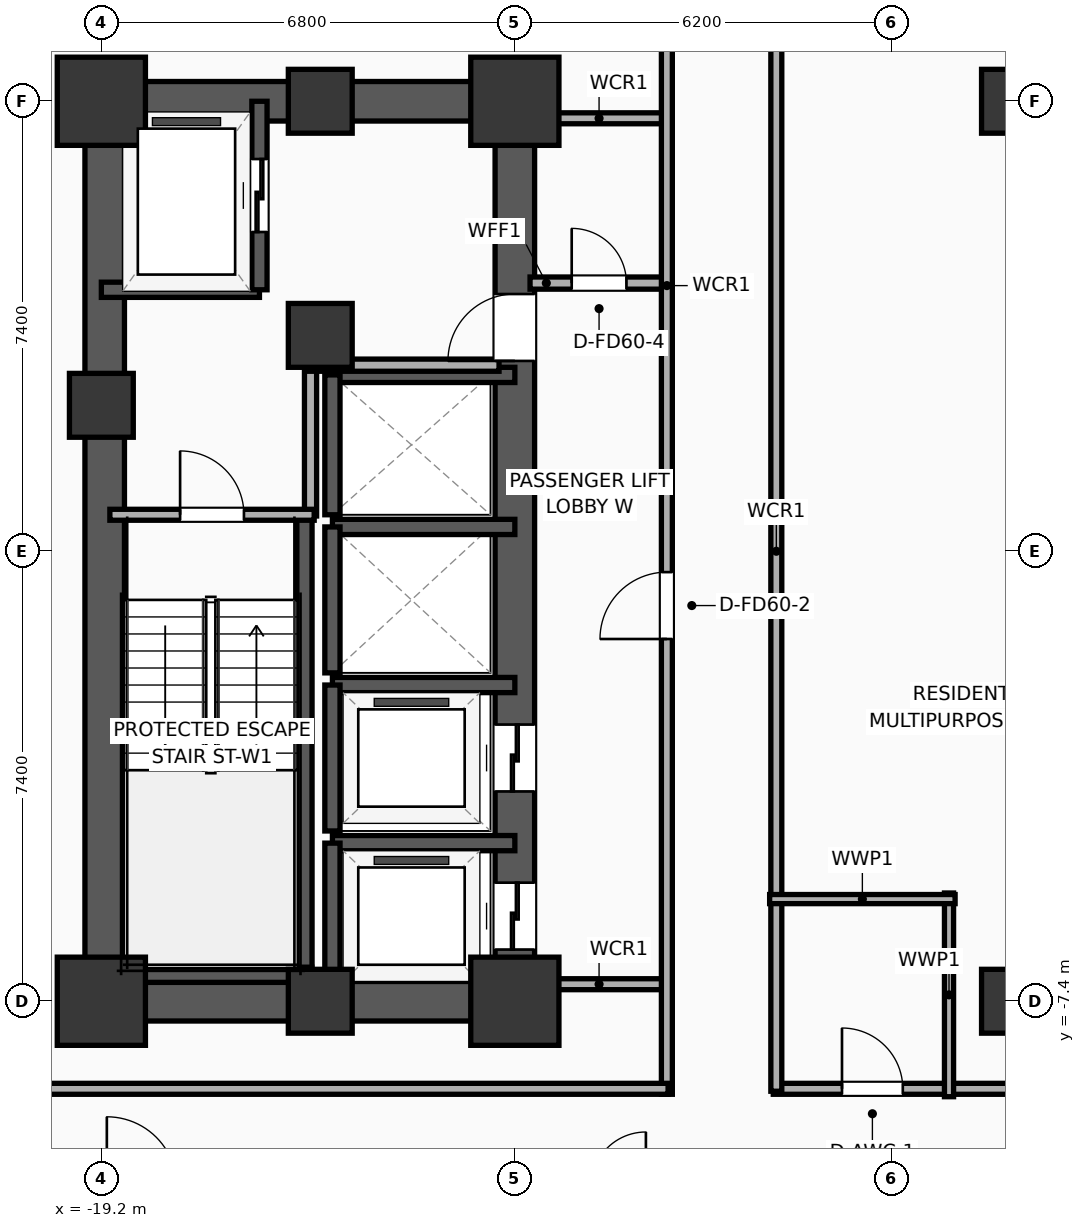
"""IFC4 building model, lengths in metres.
Left out: names, types, materials, properties, quantities, classifications, styles, units other than length and angle.
Written with IfcOpenShell. Run it as: python <this file> out.ifc"""

import sys

from ifc_helpers import new_model, si_unit, direction, frame, frame_2d, origin, origin_2d, place, context, subcontext, project, spatial, rectangle, extrude, element, fill, save


model = new_model("IFC4")
c1 = context("Model", 3, precision=1e-05, world=origin(), true_north=direction((0.0, 1.0)))
c2 = subcontext(c1, "Body", "Model", "MODEL_VIEW")
j1 = project(units=[si_unit("LENGTHUNIT", "METRE"), si_unit("PLANEANGLEUNIT", "RADIAN")], contexts=[c1])
p1 = place(None, origin())
s1 = spatial("IfcSite", under=j1, at=p1, CompositionType="ELEMENT")
p2 = place(p1, origin())
s2 = spatial("IfcBuilding", under=s1, at=p2, CompositionType="ELEMENT")
p3 = place(p2, frame((0.0, 0.0, 57.2)))
s3 = spatial("IfcBuildingStorey", under=s2, at=p3, CompositionType="ELEMENT", Elevation=57.2)
p4 = place(p3, frame((-19.2, -7.4, 0.0), z_axis=(0.0, 0.0, 1.0), x_axis=(1.0, 0.0, 0.0)))
e1 = element("IfcColumn", 1, at=p4, inside=s3, PredefinedType="COLUMN", context=c2, shape_type="SweptSolid", body=[
    extrude(rectangle(XDim=1.45, YDim=1.45, at=origin_2d()), origin(), (0.0, 0.0, 1.0), 3.9),
])
p5 = place(p3, frame((-19.2, 2.4, 0.0), z_axis=(0.0, 0.0, 1.0), x_axis=(1.0, 0.0, 0.0)))
e2 = element("IfcColumn", 2, at=p5, inside=s3, PredefinedType="COLUMN", context=c2, shape_type="SweptSolid", body=[
    extrude(rectangle(XDim=1.05, YDim=1.05, at=origin_2d()), origin(), (0.0, 0.0, 1.0), 3.9),
])
p6 = place(p3, frame((-19.2, 7.4, 0.0), z_axis=(0.0, 0.0, 1.0), x_axis=(1.0, 0.0, 0.0)))
e3 = element("IfcColumn", 3, at=p6, inside=s3, PredefinedType="COLUMN", context=c2, shape_type="SweptSolid", body=[
    extrude(rectangle(XDim=1.45, YDim=1.45, at=origin_2d()), origin(), (0.0, 0.0, 1.0), 3.9),
])
for number, where, z_axis, x_axis in (
    (4, (-15.6, -7.4, 0.0), (0.0, 0.0, 1.0), (1.0, 0.0, 0.0)),
    (5, (-15.6, 7.4, 0.0), (0.0, 0.0, 1.0), (1.0, 0.0, 0.0)),
):
    element("IfcColumn", number, at=place(p3, frame(where, z_axis=z_axis, x_axis=x_axis)), inside=s3, PredefinedType="COLUMN", context=c2, shape_type="SweptSolid", body=[
        extrude(rectangle(XDim=1.05, YDim=1.05, at=origin_2d()), origin(), (0.0, 0.0, 1.0), 3.9),
    ])
p7 = place(p3, frame((-12.4, -7.4, 0.0), z_axis=(0.0, 0.0, 1.0), x_axis=(1.0, 0.0, 0.0)))
e6 = element("IfcColumn", 6, at=p7, inside=s3, PredefinedType="COLUMN", context=c2, shape_type="SweptSolid", body=[
    extrude(rectangle(XDim=1.45, YDim=1.45, at=origin_2d()), origin(), (0.0, 0.0, 1.0), 3.9),
])
p8 = place(p3, frame((-15.6, 3.55, 0.0), z_axis=(0.0, 0.0, 1.0), x_axis=(1.0, 0.0, 0.0)))
e7 = element("IfcColumn", 7, at=p8, inside=s3, PredefinedType="COLUMN", context=c2, shape_type="SweptSolid", body=[
    extrude(rectangle(XDim=1.05, YDim=1.05, at=origin_2d()), origin(), (0.0, 0.0, 1.0), 3.9),
])
p9 = place(p3, frame((-12.4, 7.4, 0.0), z_axis=(0.0, 0.0, 1.0), x_axis=(1.0, 0.0, 0.0)))
e8 = element("IfcColumn", 8, at=p9, inside=s3, PredefinedType="COLUMN", context=c2, shape_type="SweptSolid", body=[
    extrude(rectangle(XDim=1.45, YDim=1.45, at=origin_2d()), origin(), (0.0, 0.0, 1.0), 3.9),
])
for number, where, z_axis, x_axis in (
    (9, (-19.525, -7.4, 0.0), (0.0, 0.0, 1.0), (1.0, 0.0, 0.0)),
    (10, (-19.525, 7.4, 0.0), (0.0, 0.0, 1.0), (1.0, 0.0, 0.0)),
):
    element("IfcWall", number, at=place(p3, frame(where, z_axis=z_axis, x_axis=x_axis)), inside=s3, PredefinedType="SHEAR", context=c2, shape_type="SweptSolid", body=[
        extrude(rectangle(XDim=7.45, YDim=0.65, at=frame_2d((3.725, 0.0))), origin(), (0.0, 0.0, 1.0), 3.65),
    ])
p10 = place(p3, frame((-19.145, -7.4, 0.0), z_axis=(0.0, 0.0, 1.0), x_axis=(0.0, 1.0, 0.0)))
e11 = element("IfcWall", 11, at=p10, inside=s3, PredefinedType="SHEAR", context=c2, shape_type="SweptSolid", body=[
    extrude(rectangle(XDim=14.8, YDim=0.65, at=frame_2d((7.4, 0.0))), origin(), (0.0, 0.0, 1.0), 3.65),
])
p11 = place(p3, frame((-12.4, -7.4, 0.0), z_axis=(0.0, 0.0, 1.0), x_axis=(0.0, 1.0, 0.0)))
e12 = element("IfcWall", 12, at=p11, inside=s3, PredefinedType="SHEAR", context=c2, shape_type="SweptSolid", body=[
    extrude(rectangle(XDim=14.8, YDim=0.65, at=frame_2d((7.4, 0.0))), origin(), (0.0, 0.0, 1.0), 3.65),
])
p12 = place(p11, frame((0.85, 0.0, 0.0)))
e13 = element("IfcOpeningElement", 13, at=p12, cuts=e12, PredefinedType="OPENING", context=c2, shape_type="SweptSolid", body=[
    extrude(rectangle(XDim=1.1, YDim=2.05, at=frame_2d((0.55, 1.025))), frame((0.0, 0.335, 0.0), z_axis=(0.0, -1.0, 0.0), x_axis=(1.0, 0.0, 0.0)), (0.0, 0.0, 1.0), 0.67),
])
p13 = place(p11, frame((3.45, 0.0, 0.0)))
e14 = element("IfcOpeningElement", 14, at=p13, cuts=e12, PredefinedType="OPENING", context=c2, shape_type="SweptSolid", body=[
    extrude(rectangle(XDim=1.1, YDim=2.05, at=frame_2d((0.55, 1.025))), frame((0.0, 0.335, 0.0), z_axis=(0.0, -1.0, 0.0), x_axis=(1.0, 0.0, 0.0)), (0.0, 0.0, 1.0), 0.67),
])
p14 = place(p11, frame((10.53, 0.0, 0.0)))
e15 = element("IfcOpeningElement", 15, at=p14, cuts=e12, PredefinedType="OPENING", context=c2, shape_type="SweptSolid", body=[
    extrude(rectangle(XDim=1.1, YDim=2.05, at=frame_2d((0.55, 1.025))), frame((0.0, 0.335, 0.0), z_axis=(0.0, -1.0, 0.0), x_axis=(1.0, 0.0, 0.0)), (0.0, 0.0, 1.0), 0.67),
])
p15 = place(p3, frame((-15.86, -7.085, 0.0), z_axis=(0.0, 0.0, 1.0), x_axis=(0.0, 1.0, 0.0)))
e16 = element("IfcWall", 16, at=p15, inside=s3, PredefinedType="SOLIDWALL", context=c2, shape_type="SweptSolid", body=[
    extrude(rectangle(XDim=7.685, YDim=0.25, at=frame_2d((3.843, 0.0))), origin(), (0.0, 0.0, 1.0), 3.65),
])
p16 = place(p3, frame((-19.2, -6.965, 0.0), z_axis=(0.0, 0.0, 1.0), x_axis=(1.0, 0.0, 0.0)))
e17 = element("IfcWall", 17, at=p16, inside=s3, PredefinedType="SOLIDWALL", context=c2, shape_type="SweptSolid", body=[
    extrude(rectangle(XDim=3.46, YDim=0.25, at=frame_2d((1.73, 0.0))), origin(), (0.0, 0.0, 1.0), 3.65),
])
for number, where, z_axis, x_axis in (
    (18, (-4.2, -7.4, 0.0), (0.0, 0.0, 1.0), (1.0, 0.0, 0.0)),
    (19, (-4.2, 7.4, 0.0), (0.0, 0.0, 1.0), (1.0, 0.0, 0.0)),
):
    element("IfcColumn", number, at=place(p3, frame(where, z_axis=z_axis, x_axis=x_axis)), inside=s3, PredefinedType="COLUMN", context=c2, shape_type="SweptSolid", body=[
        extrude(rectangle(XDim=1.05, YDim=1.05, at=origin_2d()), origin(), (0.0, 0.0, 1.0), 3.9),
    ])
p17 = place(p3, frame((-19.2, 4.3, 0.0), z_axis=(0.0, 0.0, 1.0), x_axis=(1.0, 0.0, 0.0)))
e20 = element("IfcWall", 20, at=p17, inside=s3, PredefinedType="SOLIDWALL", context=c2, shape_type="SweptSolid", body=[
    extrude(rectangle(XDim=2.6, YDim=0.25, at=frame_2d((1.3, 0.0))), origin(), (0.0, 0.0, 1.0), 3.65),
])
p18 = place(p3, frame((-16.6, 4.3, 0.0), z_axis=(0.0, 0.0, 1.0), x_axis=(0.0, 1.0, 0.0)))
e21 = element("IfcWall", 21, at=p18, inside=s3, PredefinedType="SOLIDWALL", context=c2, shape_type="SweptSolid", body=[
    extrude(rectangle(XDim=3.1, YDim=0.25, at=frame_2d((1.55, 0.0))), origin(), (0.0, 0.0, 1.0), 3.65),
])
p19 = place(p18, frame((0.95, 0.0, 0.0)))
e22 = element("IfcOpeningElement", 22, at=p19, cuts=e21, PredefinedType="OPENING", context=c2, shape_type="SweptSolid", body=[
    extrude(rectangle(XDim=1.2, YDim=2.05, at=frame_2d((0.6, 1.025))), frame((0.0, 0.135, 0.0), z_axis=(0.0, -1.0, 0.0), x_axis=(1.0, 0.0, 0.0)), (0.0, 0.0, 1.0), 0.27),
])
p20 = place(p3, frame((-12.4, -4.8, 0.0), z_axis=(0.0, 0.0, 1.0), x_axis=(-1.0, 0.0, 0.0)))
e23 = element("IfcWall", 23, at=p20, inside=s3, PredefinedType="SOLIDWALL", context=c2, shape_type="SweptSolid", body=[
    extrude(rectangle(XDim=3.0, YDim=0.25, at=frame_2d((1.5, 0.0))), origin(), (0.0, 0.0, 1.0), 3.65),
])
p21 = place(p3, frame((-15.4, -4.8, 0.0), z_axis=(0.0, 0.0, 1.0), x_axis=(0.0, -1.0, 0.0)))
e24 = element("IfcWall", 24, at=p21, inside=s3, PredefinedType="SOLIDWALL", context=c2, shape_type="SweptSolid", body=[
    extrude(rectangle(XDim=2.6, YDim=0.25, at=frame_2d((1.3, 0.0))), origin(), (0.0, 0.0, 1.0), 3.65),
])
p22 = place(p3, frame((-12.4, -2.2, 0.0), z_axis=(0.0, 0.0, 1.0), x_axis=(-1.0, 0.0, 0.0)))
e25 = element("IfcWall", 25, at=p22, inside=s3, PredefinedType="SOLIDWALL", context=c2, shape_type="SweptSolid", body=[
    extrude(rectangle(XDim=3.0, YDim=0.25, at=frame_2d((1.5, 0.0))), origin(), (0.0, 0.0, 1.0), 3.65),
])
p23 = place(p3, frame((-15.4, -2.2, 0.0), z_axis=(0.0, 0.0, 1.0), x_axis=(0.0, -1.0, 0.0)))
e26 = element("IfcWall", 26, at=p23, inside=s3, PredefinedType="SOLIDWALL", context=c2, shape_type="SweptSolid", body=[
    extrude(rectangle(XDim=2.4, YDim=0.25, at=frame_2d((1.2, 0.0))), origin(), (0.0, 0.0, 1.0), 3.65),
])
p24 = place(p3, frame((-12.4, 0.4, 0.0), z_axis=(0.0, 0.0, 1.0), x_axis=(-1.0, 0.0, 0.0)))
e27 = element("IfcWall", 27, at=p24, inside=s3, PredefinedType="SOLIDWALL", context=c2, shape_type="SweptSolid", body=[
    extrude(rectangle(XDim=3.0, YDim=0.25, at=frame_2d((1.5, 0.0))), origin(), (0.0, 0.0, 1.0), 3.65),
])
p25 = place(p3, frame((-15.4, 0.4, 0.0), z_axis=(0.0, 0.0, 1.0), x_axis=(0.0, -1.0, 0.0)))
e28 = element("IfcWall", 28, at=p25, inside=s3, PredefinedType="SOLIDWALL", context=c2, shape_type="SweptSolid", body=[
    extrude(rectangle(XDim=2.4, YDim=0.25, at=frame_2d((1.2, 0.0))), origin(), (0.0, 0.0, 1.0), 3.65),
])
p26 = place(p3, frame((-12.4, 2.9, 0.0), z_axis=(0.0, 0.0, 1.0), x_axis=(-1.0, 0.0, 0.0)))
e29 = element("IfcWall", 29, at=p26, inside=s3, PredefinedType="SOLIDWALL", context=c2, shape_type="SweptSolid", body=[
    extrude(rectangle(XDim=3.0, YDim=0.25, at=frame_2d((1.5, 0.0))), origin(), (0.0, 0.0, 1.0), 3.65),
])
p27 = place(p3, frame((-15.4, 2.9, 0.0), z_axis=(0.0, 0.0, 1.0), x_axis=(0.0, -1.0, 0.0)))
e30 = element("IfcWall", 30, at=p27, inside=s3, PredefinedType="SOLIDWALL", context=c2, shape_type="SweptSolid", body=[
    extrude(rectangle(XDim=2.3, YDim=0.25, at=frame_2d((1.15, 0.0))), origin(), (0.0, 0.0, 1.0), 3.65),
])
p28 = place(p3, frame((-15.76, 0.58, 0.0), z_axis=(0.0, 0.0, 1.0), x_axis=(0.0, 1.0, 0.0)))
e31 = element("IfcWall", 31, at=p28, inside=s3, PredefinedType="PARTITIONING", context=c2, shape_type="SweptSolid", body=[
    extrude(rectangle(XDim=2.52, YDim=0.2, at=frame_2d((1.26, 0.0))), origin(), (0.0, 0.0, 1.0), 3.65),
])
p29 = place(p3, frame((-15.82, 3.06, 0.0), z_axis=(0.0, 0.0, 1.0), x_axis=(1.0, 0.0, 0.0)))
e32 = element("IfcWall", 32, at=p29, inside=s3, PredefinedType="PARTITIONING", context=c2, shape_type="SweptSolid", body=[
    extrude(rectangle(XDim=3.16, YDim=0.2, at=frame_2d((1.58, 0.0))), origin(), (0.0, 0.0, 1.0), 3.65),
])
p30 = place(p3, frame((-19.06, 0.6, 0.0), z_axis=(0.0, 0.0, 1.0), x_axis=(1.0, 0.0, 0.0)))
e33 = element("IfcWall", 33, at=p30, inside=s3, PredefinedType="PARTITIONING", context=c2, shape_type="SweptSolid", body=[
    extrude(rectangle(XDim=3.36, YDim=0.18, at=frame_2d((1.68, 0.0))), origin(), (0.0, 0.0, 1.0), 3.65),
])
p31 = place(p30, frame((1.155, 0.0, 0.0)))
e34 = element("IfcOpeningElement", 34, at=p31, cuts=e33, PredefinedType="OPENING", context=c2, shape_type="SweptSolid", body=[
    extrude(rectangle(XDim=1.05, YDim=2.05, at=frame_2d((0.525, 1.025))), frame((0.0, 0.1, 0.0), z_axis=(0.0, -1.0, 0.0), x_axis=(1.0, 0.0, 0.0)), (0.0, 0.0, 1.0), 0.2),
])
p32 = place(p3, frame((-12.15, 4.41, 0.0), z_axis=(0.0, 0.0, 1.0), x_axis=(1.0, 0.0, 0.0)))
e35 = element("IfcWall", 35, at=p32, inside=s3, PredefinedType="PARTITIONING", context=c2, shape_type="SweptSolid", body=[
    extrude(rectangle(XDim=2.27, YDim=0.2, at=frame_2d((1.135, 0.0))), origin(), (0.0, 0.0, 1.0), 3.65),
])
p33 = place(p32, frame((0.685, 0.0, 0.0)))
e36 = element("IfcOpeningElement", 36, at=p33, cuts=e35, PredefinedType="OPENING", context=c2, shape_type="SweptSolid", body=[
    extrude(rectangle(XDim=0.9, YDim=2.05, at=frame_2d((0.45, 1.025))), frame((0.0, 0.11, 0.0), z_axis=(0.0, -1.0, 0.0), x_axis=(1.0, 0.0, 0.0)), (0.0, 0.0, 1.0), 0.22),
])
for number, where, z_axis, x_axis in (
    (37, (-12.15, 7.12, 0.0), (0.0, 0.0, 1.0), (1.0, 0.0, 0.0)),
    (38, (-12.15, -7.12, 0.0), (0.0, 0.0, 1.0), (1.0, 0.0, 0.0)),
):
    element("IfcWall", number, at=place(p3, frame(where, z_axis=z_axis, x_axis=x_axis)), inside=s3, PredefinedType="PARTITIONING", context=c2, shape_type="SweptSolid", body=[
        extrude(rectangle(XDim=2.27, YDim=0.18, at=frame_2d((1.135, 0.0))), origin(), (0.0, 0.0, 1.0), 2.94),
    ])
p34 = place(p3, frame((-9.9, -8.93, 0.0), z_axis=(0.0, 0.0, 1.0), x_axis=(0.0, 1.0, 0.0)))
e39 = element("IfcWall", 39, at=p34, inside=s3, PredefinedType="PARTITIONING", context=c2, shape_type="SweptSolid", body=[
    extrude(rectangle(XDim=17.86, YDim=0.18, at=frame_2d((8.93, 0.0))), origin(), (0.0, 0.0, 1.0), 3.65),
])
p35 = place(p34, frame((7.487, 0.0, 0.0)))
e40 = element("IfcOpeningElement", 40, at=p35, cuts=e39, PredefinedType="OPENING", context=c2, shape_type="SweptSolid", body=[
    extrude(rectangle(XDim=1.1, YDim=2.05, at=frame_2d((0.55, 1.025))), frame((0.0, 0.1, 0.0), z_axis=(0.0, -1.0, 0.0), x_axis=(1.0, 0.0, 0.0)), (0.0, 0.0, 1.0), 0.2),
])
p36 = place(p3, frame((-33.41, -8.84, 0.0), z_axis=(0.0, 0.0, 1.0), x_axis=(1.0, 0.0, 0.0)))
e41 = element("IfcWall", 41, at=p36, inside=s3, PredefinedType="PARTITIONING", context=c2, shape_type="SweptSolid", body=[
    extrude(rectangle(XDim=23.53, YDim=0.18, at=frame_2d((11.765, 0.0))), origin(), (0.0, 0.0, 1.0), 3.65),
])
p37 = place(p3, frame((-8.15, -8.84, 0.0), z_axis=(0.0, 0.0, 1.0), x_axis=(1.0, 0.0, 0.0)))
e42 = element("IfcWall", 42, at=p37, inside=s3, PredefinedType="PARTITIONING", context=c2, shape_type="SweptSolid", body=[
    extrude(rectangle(XDim=16.3, YDim=0.18, at=frame_2d((8.15, 0.0))), origin(), (0.0, 0.0, 1.0), 3.65),
])
p38 = place(p37, frame((1.13, 0.0, 0.0)))
e43 = element("IfcOpeningElement", 43, at=p38, cuts=e42, PredefinedType="OPENING", context=c2, shape_type="SweptSolid", body=[
    extrude(rectangle(XDim=1.0, YDim=2.05, at=frame_2d((0.5, 1.025))), frame((0.0, 0.1, 0.0), z_axis=(0.0, -1.0, 0.0), x_axis=(1.0, 0.0, 0.0)), (0.0, 0.0, 1.0), 0.2),
])
p39 = place(p37, frame((10.12, 0.0, 0.0)))
e44 = element("IfcOpeningElement", 44, at=p39, cuts=e42, PredefinedType="OPENING", context=c2, shape_type="SweptSolid", body=[
    extrude(rectangle(XDim=0.95, YDim=2.05, at=frame_2d((0.475, 1.025))), frame((0.0, 0.1, 0.0), z_axis=(0.0, -1.0, 0.0), x_axis=(1.0, 0.0, 0.0)), (0.0, 0.0, 1.0), 0.2),
])
p40 = place(p3, frame((-8.1, -8.88, 0.0), z_axis=(0.0, 0.0, 1.0), x_axis=(0.0, 1.0, 0.0)))
e45 = element("IfcWall", 45, at=p40, inside=s3, PredefinedType="PARTITIONING", context=c2, shape_type="SweptSolid", body=[
    extrude(rectangle(XDim=17.76, YDim=0.18, at=frame_2d((8.88, 0.0))), origin(), (0.0, 0.0, 1.0), 3.65),
])
p41 = place(p3, frame((-5.26, -8.97, 0.0), z_axis=(0.0, 0.0, 1.0), x_axis=(0.0, 1.0, 0.0)))
e46 = element("IfcWall", 46, at=p41, inside=s3, PredefinedType="PLUMBINGWALL", context=c2, shape_type="SweptSolid", body=[
    extrude(rectangle(XDim=3.35, YDim=0.15, at=frame_2d((1.675, 0.0))), origin(), (0.0, 0.0, 1.0), 3.65),
])
p42 = place(p3, frame((-8.21, -5.72, 0.0), z_axis=(0.0, 0.0, 1.0), x_axis=(1.0, 0.0, 0.0)))
e47 = element("IfcWall", 47, at=p42, inside=s3, PredefinedType="PLUMBINGWALL", context=c2, shape_type="SweptSolid", body=[
    extrude(rectangle(XDim=3.05, YDim=0.15, at=frame_2d((1.525, 0.0))), origin(), (0.0, 0.0, 1.0), 3.65),
])
p43 = place(p19, origin())
e48 = element("IfcDoor", 48, at=p43, inside=s3, OperationType="SLIDING_TO_LEFT", PredefinedType="DOOR", context=c2, shape_type="SweptSolid", body=[
    extrude(rectangle(XDim=1.2, YDim=2.05, at=frame_2d((0.6, 1.025))), frame((0.0, 0.025, 0.0), z_axis=(0.0, -1.0, 0.0), x_axis=(1.0, 0.0, 0.0)), (0.0, 0.0, 1.0), 0.05),
])
fill(e22, e48)
p44 = place(p12, origin())
e49 = element("IfcDoor", 49, at=p44, inside=s3, OperationType="SLIDING_TO_LEFT", PredefinedType="DOOR", context=c2, shape_type="SweptSolid", body=[
    extrude(rectangle(XDim=1.1, YDim=2.05, at=frame_2d((0.55, 1.025))), frame((0.0, 0.025, 0.0), z_axis=(0.0, -1.0, 0.0), x_axis=(1.0, 0.0, 0.0)), (0.0, 0.0, 1.0), 0.05),
])
fill(e13, e49)
p45 = place(p13, origin())
e50 = element("IfcDoor", 50, at=p45, inside=s3, OperationType="SLIDING_TO_LEFT", PredefinedType="DOOR", context=c2, shape_type="SweptSolid", body=[
    extrude(rectangle(XDim=1.1, YDim=2.05, at=frame_2d((0.55, 1.025))), frame((0.0, 0.025, 0.0), z_axis=(0.0, -1.0, 0.0), x_axis=(1.0, 0.0, 0.0)), (0.0, 0.0, 1.0), 0.05),
])
fill(e14, e50)
p46 = place(p31, origin())
e51 = element("IfcDoor", 51, at=p46, inside=s3, OperationType="SINGLE_SWING_LEFT", PredefinedType="DOOR", context=c2, shape_type="SweptSolid", body=[
    extrude(rectangle(XDim=1.05, YDim=2.05, at=frame_2d((0.525, 1.025))), frame((0.0, 0.025, 0.0), z_axis=(0.0, -1.0, 0.0), x_axis=(1.0, 0.0, 0.0)), (0.0, 0.0, 1.0), 0.05),
])
fill(e34, e51)
p47 = place(p33, origin())
e52 = element("IfcDoor", 52, at=p47, inside=s3, OperationType="SINGLE_SWING_LEFT", PredefinedType="DOOR", context=c2, shape_type="SweptSolid", body=[
    extrude(rectangle(XDim=0.9, YDim=2.05, at=frame_2d((0.45, 1.025))), frame((0.0, 0.025, 0.0), z_axis=(0.0, -1.0, 0.0), x_axis=(1.0, 0.0, 0.0)), (0.0, 0.0, 1.0), 0.05),
])
fill(e36, e52)
p48 = place(p35, origin())
e53 = element("IfcDoor", 53, at=p48, inside=s3, OperationType="SINGLE_SWING_LEFT", PredefinedType="DOOR", context=c2, shape_type="SweptSolid", body=[
    extrude(rectangle(XDim=1.1, YDim=2.05, at=frame_2d((0.55, 1.025))), frame((0.0, 0.025, 0.0), z_axis=(0.0, -1.0, 0.0), x_axis=(1.0, 0.0, 0.0)), (0.0, 0.0, 1.0), 0.05),
])
fill(e40, e53)
p49 = place(p38, origin())
e54 = element("IfcDoor", 54, at=p49, inside=s3, OperationType="SINGLE_SWING_LEFT", PredefinedType="DOOR", context=c2, shape_type="SweptSolid", body=[
    extrude(rectangle(XDim=1.0, YDim=2.05, at=frame_2d((0.5, 1.025))), frame((0.0, 0.025, 0.0), z_axis=(0.0, -1.0, 0.0), x_axis=(1.0, 0.0, 0.0)), (0.0, 0.0, 1.0), 0.05),
])
fill(e43, e54)
p50 = place(p14, origin())
e55 = element("IfcDoor", 55, at=p50, inside=s3, OperationType="SINGLE_SWING_LEFT", PredefinedType="DOOR", context=c2, shape_type="SweptSolid", body=[
    extrude(rectangle(XDim=1.1, YDim=2.05, at=frame_2d((0.55, 1.025))), frame((0.0, 0.025, 0.0), z_axis=(0.0, -1.0, 0.0), x_axis=(1.0, 0.0, 0.0)), (0.0, 0.0, 1.0), 0.05),
])
fill(e15, e55)
save(model, sys.argv[1])
